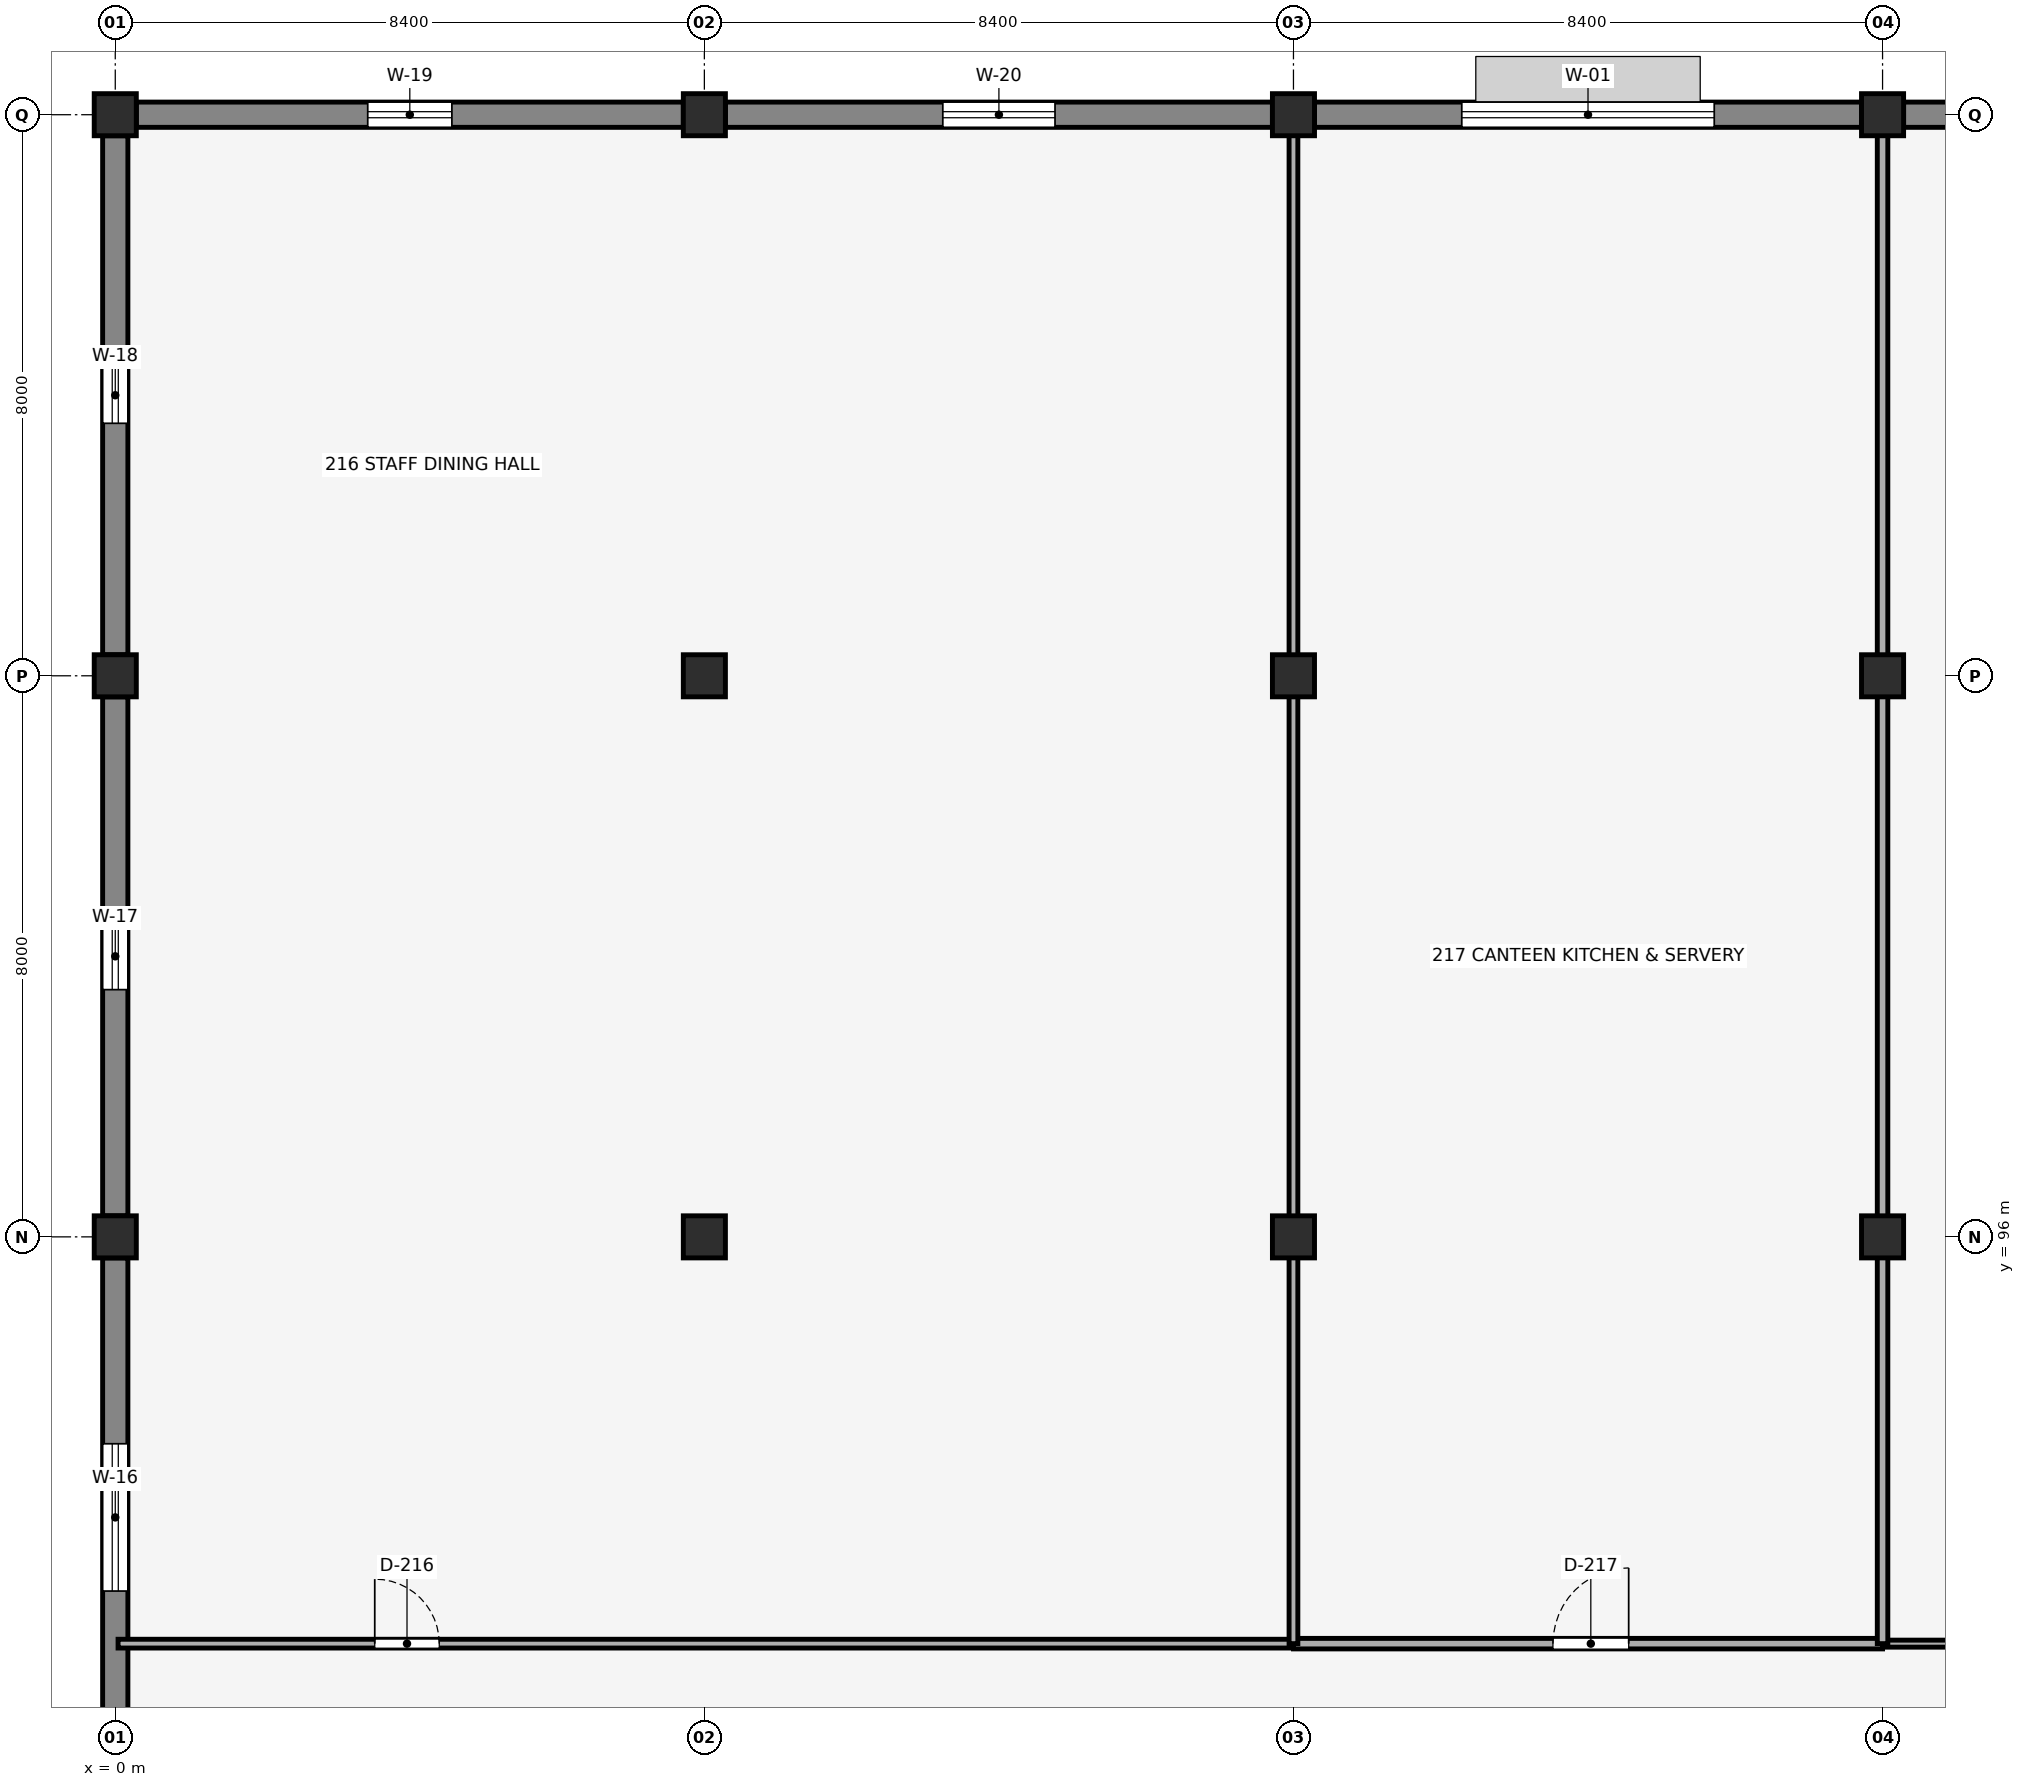
"""IFC4 building model, lengths in metres.
Left out: names, types, materials, properties, quantities, classifications, styles, units other than length and angle.
Written with IfcOpenShell. Run it as: python <this file> out.ifc"""

import sys

from ifc_helpers import new_model, si_unit, direction, frame, frame_2d, origin, origin_2d, place, context, subcontext, project, spatial, rectangle, extrude, element, fill, save


model = new_model("IFC4")
c1 = context("Model", 3, precision=1e-05, world=origin(), true_north=direction((0.0, 1.0)))
c2 = subcontext(c1, "Body", "Model", "MODEL_VIEW")
j1 = project(units=[si_unit("LENGTHUNIT", "METRE"), si_unit("PLANEANGLEUNIT", "RADIAN")], contexts=[c1])
p1 = place(None, origin())
s1 = spatial("IfcSite", under=j1, at=p1, CompositionType="ELEMENT")
p2 = place(p1, origin())
s2 = spatial("IfcBuilding", under=s1, at=p2, CompositionType="ELEMENT")
p3 = place(p2, frame((0.0, 0.0, 9.52)))
s3 = spatial("IfcBuildingStorey", under=s2, at=p3, CompositionType="ELEMENT", Elevation=9.52)
for number, where, z_axis, x_axis in (
    (1, (0.0, 96.0, 0.0), (0.0, 0.0, 1.0), (1.0, 0.0, 0.0)),
    (2, (0.0, 104.0, 0.0), (0.0, 0.0, 1.0), (1.0, 0.0, 0.0)),
    (3, (0.0, 112.0, 0.0), (0.0, 0.0, 1.0), (1.0, 0.0, 0.0)),
    (4, (8.4, 96.0, 0.0), (0.0, 0.0, 1.0), (1.0, 0.0, 0.0)),
    (5, (8.4, 104.0, 0.0), (0.0, 0.0, 1.0), (1.0, 0.0, 0.0)),
    (6, (8.4, 112.0, 0.0), (0.0, 0.0, 1.0), (1.0, 0.0, 0.0)),
    (7, (16.8, 96.0, 0.0), (0.0, 0.0, 1.0), (1.0, 0.0, 0.0)),
    (8, (16.8, 104.0, 0.0), (0.0, 0.0, 1.0), (1.0, 0.0, 0.0)),
    (9, (16.8, 112.0, 0.0), (0.0, 0.0, 1.0), (1.0, 0.0, 0.0)),
    (10, (25.2, 96.0, 0.0), (0.0, 0.0, 1.0), (1.0, 0.0, 0.0)),
    (11, (25.2, 104.0, 0.0), (0.0, 0.0, 1.0), (1.0, 0.0, 0.0)),
    (12, (25.2, 112.0, 0.0), (0.0, 0.0, 1.0), (1.0, 0.0, 0.0)),
):
    element("IfcColumn", number, at=place(p3, frame(where, z_axis=z_axis, x_axis=x_axis)), inside=s3, PredefinedType="COLUMN", context=c2, shape_type="SweptSolid", body=[
        extrude(rectangle(XDim=0.6, YDim=0.6, at=origin_2d()), origin(), (0.0, 0.0, 1.0), 3.57),
    ])
p4 = place(p3, frame((0.0, 88.3, 0.0), z_axis=(0.0, 0.0, 1.0), x_axis=(0.0, 1.0, 0.0)))
e13 = element("IfcWall", 13, at=p4, inside=s3, PredefinedType="SOLIDWALL", context=c2, shape_type="SweptSolid", body=[
    extrude(rectangle(XDim=7.4, YDim=0.36, at=frame_2d((3.7, 0.0))), origin(), (0.0, 0.0, 1.0), 3.219),
])
p5 = place(p4, frame((2.65, 0.0, 1.55), z_axis=(0.0, 0.0, 1.0), x_axis=(1.0, 0.0, 0.0)))
e14 = element("IfcOpeningElement", 14, at=p5, cuts=e13, PredefinedType="OPENING", context=c2, shape_type="SweptSolid", body=[
    extrude(rectangle(XDim=2.1, YDim=0.8, at=frame_2d((1.05, 0.4))), frame((0.0, 0.19, 0.0), z_axis=(0.0, -1.0, 0.0), x_axis=(1.0, 0.0, 0.0)), (0.0, 0.0, 1.0), 0.38),
])
p6 = place(p3, frame((0.0, 96.3, 0.0), z_axis=(0.0, 0.0, 1.0), x_axis=(0.0, 1.0, 0.0)))
e15 = element("IfcWall", 15, at=p6, inside=s3, PredefinedType="SOLIDWALL", context=c2, shape_type="SweptSolid", body=[
    extrude(rectangle(XDim=7.4, YDim=0.36, at=frame_2d((3.7, 0.0))), origin(), (0.0, 0.0, 1.0), 3.219),
])
p7 = place(p6, frame((3.225, 0.0, 0.65), z_axis=(0.0, 0.0, 1.0), x_axis=(1.0, 0.0, 0.0)))
e16 = element("IfcOpeningElement", 16, at=p7, cuts=e15, PredefinedType="OPENING", context=c2, shape_type="SweptSolid", body=[
    extrude(rectangle(XDim=0.95, YDim=2.1, at=frame_2d((0.475, 1.05))), frame((0.0, 0.19, 0.0), z_axis=(0.0, -1.0, 0.0), x_axis=(1.0, 0.0, 0.0)), (0.0, 0.0, 1.0), 0.38),
])
p8 = place(p3, frame((0.0, 104.3, 0.0), z_axis=(0.0, 0.0, 1.0), x_axis=(0.0, 1.0, 0.0)))
e17 = element("IfcWall", 17, at=p8, inside=s3, PredefinedType="SOLIDWALL", context=c2, shape_type="SweptSolid", body=[
    extrude(rectangle(XDim=7.4, YDim=0.36, at=frame_2d((3.7, 0.0))), origin(), (0.0, 0.0, 1.0), 3.219),
])
p9 = place(p8, frame((3.3, 0.0, 0.65), z_axis=(0.0, 0.0, 1.0), x_axis=(1.0, 0.0, 0.0)))
e18 = element("IfcOpeningElement", 18, at=p9, cuts=e17, PredefinedType="OPENING", context=c2, shape_type="SweptSolid", body=[
    extrude(rectangle(XDim=0.8, YDim=1.85, at=frame_2d((0.4, 0.925))), frame((0.0, 0.19, 0.0), z_axis=(0.0, -1.0, 0.0), x_axis=(1.0, 0.0, 0.0)), (0.0, 0.0, 1.0), 0.38),
])
p10 = place(p3, frame((0.3, 112.0, 0.0), z_axis=(0.0, 0.0, 1.0), x_axis=(1.0, 0.0, 0.0)))
e19 = element("IfcWall", 19, at=p10, inside=s3, PredefinedType="SOLIDWALL", context=c2, shape_type="SweptSolid", body=[
    extrude(rectangle(XDim=7.8, YDim=0.36, at=frame_2d((3.9, 0.0))), origin(), (0.0, 0.0, 1.0), 3.27),
])
p11 = place(p10, frame((3.3, 0.0, 1.55), z_axis=(0.0, 0.0, 1.0), x_axis=(1.0, 0.0, 0.0)))
e20 = element("IfcOpeningElement", 20, at=p11, cuts=e19, PredefinedType="OPENING", context=c2, shape_type="SweptSolid", body=[
    extrude(rectangle(XDim=1.2, YDim=0.95, at=frame_2d((0.6, 0.475))), frame((0.0, 0.19, 0.0), z_axis=(0.0, -1.0, 0.0), x_axis=(1.0, 0.0, 0.0)), (0.0, 0.0, 1.0), 0.38),
])
p12 = place(p3, frame((8.7, 112.0, 0.0), z_axis=(0.0, 0.0, 1.0), x_axis=(1.0, 0.0, 0.0)))
e21 = element("IfcWall", 21, at=p12, inside=s3, PredefinedType="SOLIDWALL", context=c2, shape_type="SweptSolid", body=[
    extrude(rectangle(XDim=7.8, YDim=0.36, at=frame_2d((3.9, 0.0))), origin(), (0.0, 0.0, 1.0), 3.27),
])
p13 = place(p12, frame((3.1, 0.0, 0.9), z_axis=(0.0, 0.0, 1.0), x_axis=(1.0, 0.0, 0.0)))
e22 = element("IfcOpeningElement", 22, at=p13, cuts=e21, PredefinedType="OPENING", context=c2, shape_type="SweptSolid", body=[
    extrude(rectangle(XDim=1.6, YDim=1.2, at=frame_2d((0.8, 0.6))), frame((0.0, 0.19, 0.0), z_axis=(0.0, -1.0, 0.0), x_axis=(1.0, 0.0, 0.0)), (0.0, 0.0, 1.0), 0.38),
])
p14 = place(p3, frame((17.1, 112.0, 0.0), z_axis=(0.0, 0.0, 1.0), x_axis=(1.0, 0.0, 0.0)))
e23 = element("IfcWall", 23, at=p14, inside=s3, PredefinedType="SOLIDWALL", context=c2, shape_type="SweptSolid", body=[
    extrude(rectangle(XDim=7.8, YDim=0.36, at=frame_2d((3.9, 0.0))), origin(), (0.0, 0.0, 1.0), 3.27),
])
p15 = place(p14, frame((2.1, 0.0, 0.9), z_axis=(0.0, 0.0, 1.0), x_axis=(1.0, 0.0, 0.0)))
e24 = element("IfcOpeningElement", 24, at=p15, cuts=e23, PredefinedType="OPENING", context=c2, shape_type="SweptSolid", body=[
    extrude(rectangle(XDim=3.6, YDim=1.8, at=frame_2d((1.8, 0.9))), frame((0.0, 0.19, 0.0), z_axis=(0.0, -1.0, 0.0), x_axis=(1.0, 0.0, 0.0)), (0.0, 0.0, 1.0), 0.38),
])
p16 = place(p3, frame((25.5, 112.0, 0.0), z_axis=(0.0, 0.0, 1.0), x_axis=(1.0, 0.0, 0.0)))
e25 = element("IfcWall", 25, at=p16, inside=s3, PredefinedType="SOLIDWALL", context=c2, shape_type="SweptSolid", body=[
    extrude(rectangle(XDim=7.8, YDim=0.36, at=frame_2d((3.9, 0.0))), origin(), (0.0, 0.0, 1.0), 3.27),
])
p17 = place(p16, frame((2.2, 0.0, 0.9), z_axis=(0.0, 0.0, 1.0), x_axis=(1.0, 0.0, 0.0)))
e26 = element("IfcOpeningElement", 26, at=p17, cuts=e25, PredefinedType="OPENING", context=c2, shape_type="SweptSolid", body=[
    extrude(rectangle(XDim=3.4, YDim=1.7, at=frame_2d((1.7, 0.85))), frame((0.0, 0.19, 0.0), z_axis=(0.0, -1.0, 0.0), x_axis=(1.0, 0.0, 0.0)), (0.0, 0.0, 1.0), 0.38),
])
p18 = place(p3, frame((0.04, 90.2, 0.0), z_axis=(0.0, 0.0, 1.0), x_axis=(1.0, 0.0, 0.0)))
e27 = element("IfcWall", 27, at=p18, inside=s3, PredefinedType="PARTITIONING", context=c2, shape_type="SweptSolid", body=[
    extrude(rectangle(XDim=16.76, YDim=0.125, at=frame_2d((8.38, 0.0))), origin(), (0.0, 0.0, 1.0), 3.107),
])
p19 = place(p18, frame((3.66, 0.0, 0.0), z_axis=(0.0, 0.0, 1.0), x_axis=(1.0, 0.0, 0.0)))
e28 = element("IfcOpeningElement", 28, at=p19, cuts=e27, PredefinedType="OPENING", context=c2, shape_type="SweptSolid", body=[
    extrude(rectangle(XDim=0.92, YDim=2.12, at=frame_2d((0.46, 1.06))), frame((0.0, 0.073, 0.0), z_axis=(0.0, -1.0, 0.0), x_axis=(1.0, 0.0, 0.0)), (0.0, 0.0, 1.0), 0.145),
])
p20 = place(p3, frame((16.8, 90.2, 0.0), z_axis=(0.0, 0.0, 1.0), x_axis=(1.0, 0.0, 0.0)))
e29 = element("IfcWall", 29, at=p20, inside=s3, PredefinedType="PARTITIONING", context=c2, shape_type="SweptSolid", body=[
    extrude(rectangle(XDim=8.4, YDim=0.15, at=frame_2d((4.2, 0.0))), origin(), (0.0, 0.0, 1.0), 3.57),
])
p21 = place(p20, frame((3.7, 0.0, 0.0), z_axis=(0.0, 0.0, 1.0), x_axis=(1.0, 0.0, 0.0)))
e30 = element("IfcOpeningElement", 30, at=p21, cuts=e29, PredefinedType="OPENING", context=c2, shape_type="SweptSolid", body=[
    extrude(rectangle(XDim=1.08, YDim=2.18, at=frame_2d((0.54, 1.09))), frame((0.0, 0.085, 0.0), z_axis=(0.0, -1.0, 0.0), x_axis=(1.0, 0.0, 0.0)), (0.0, 0.0, 1.0), 0.17),
])
p22 = place(p3, frame((25.2, 90.2, 0.0), z_axis=(0.0, 0.0, 1.0), x_axis=(1.0, 0.0, 0.0)))
e31 = element("IfcWall", 31, at=p22, inside=s3, PredefinedType="PARTITIONING", context=c2, shape_type="SweptSolid", body=[
    extrude(rectangle(XDim=16.8, YDim=0.1, at=frame_2d((8.4, 0.0))), origin(), (0.0, 0.0, 1.0), 3.57),
])
p23 = place(p22, frame((3.7, 0.0, 0.0), z_axis=(0.0, 0.0, 1.0), x_axis=(1.0, 0.0, 0.0)))
e32 = element("IfcOpeningElement", 32, at=p23, cuts=e31, PredefinedType="OPENING", context=c2, shape_type="SweptSolid", body=[
    extrude(rectangle(XDim=1.02, YDim=2.16, at=frame_2d((0.51, 1.08))), frame((0.0, 0.06, 0.0), z_axis=(0.0, -1.0, 0.0), x_axis=(1.0, 0.0, 0.0)), (0.0, 0.0, 1.0), 0.12),
])
p24 = place(p3, frame((16.8, 90.2, 0.0), z_axis=(0.0, 0.0, 1.0), x_axis=(0.0, 1.0, 0.0)))
e33 = element("IfcWall", 33, at=p24, inside=s3, PredefinedType="PARTITIONING", context=c2, shape_type="SweptSolid", body=[
    extrude(rectangle(XDim=5.51, YDim=0.125, at=frame_2d((2.755, 0.0))), origin(), (0.0, 0.0, 1.0), 3.107),
])
for number, where, z_axis, x_axis in (
    (34, (16.8, 96.29, 0.0), (0.0, 0.0, 1.0), (0.0, 1.0, 0.0)),
    (35, (16.8, 104.29, 0.0), (0.0, 0.0, 1.0), (0.0, 1.0, 0.0)),
):
    element("IfcWall", number, at=place(p3, frame(where, z_axis=z_axis, x_axis=x_axis)), inside=s3, PredefinedType="PARTITIONING", context=c2, shape_type="SweptSolid", body=[
        extrude(rectangle(XDim=7.42, YDim=0.125, at=frame_2d((3.71, 0.0))), origin(), (0.0, 0.0, 1.0), 3.107),
    ])
p25 = place(p3, frame((25.2, 90.2, 0.0), z_axis=(0.0, 0.0, 1.0), x_axis=(0.0, 1.0, 0.0)))
e36 = element("IfcWall", 36, at=p25, inside=s3, PredefinedType="PARTITIONING", context=c2, shape_type="SweptSolid", body=[
    extrude(rectangle(XDim=5.51, YDim=0.15, at=frame_2d((2.755, 0.0))), origin(), (0.0, 0.0, 1.0), 3.107),
])
for number, where, z_axis, x_axis in (
    (37, (25.2, 96.29, 0.0), (0.0, 0.0, 1.0), (0.0, 1.0, 0.0)),
    (38, (25.2, 104.29, 0.0), (0.0, 0.0, 1.0), (0.0, 1.0, 0.0)),
):
    element("IfcWall", number, at=place(p3, frame(where, z_axis=z_axis, x_axis=x_axis)), inside=s3, PredefinedType="PARTITIONING", context=c2, shape_type="SweptSolid", body=[
        extrude(rectangle(XDim=7.42, YDim=0.15, at=frame_2d((3.71, 0.0))), origin(), (0.0, 0.0, 1.0), 3.107),
    ])
p26 = place(p5, origin())
e39 = element("IfcWindow", 39, at=p26, inside=s3, PartitioningType="DOUBLE_PANEL_HORIZONTAL", PredefinedType="WINDOW", context=c2, shape_type="SweptSolid", body=[
    extrude(rectangle(XDim=2.1, YDim=0.8, at=frame_2d((1.05, 0.4))), frame((0.0, 0.03, 0.0), z_axis=(0.0, -1.0, 0.0), x_axis=(1.0, 0.0, 0.0)), (0.0, 0.0, 1.0), 0.06),
])
fill(e14, e39)
p27 = place(p7, origin())
e40 = element("IfcWindow", 40, at=p27, inside=s3, PartitioningType="SINGLE_PANEL", PredefinedType="WINDOW", context=c2, shape_type="SweptSolid", body=[
    extrude(rectangle(XDim=0.95, YDim=2.1, at=frame_2d((0.475, 1.05))), frame((0.0, 0.03, 0.0), z_axis=(0.0, -1.0, 0.0), x_axis=(1.0, 0.0, 0.0)), (0.0, 0.0, 1.0), 0.06),
])
fill(e16, e40)
p28 = place(p9, origin())
e41 = element("IfcWindow", 41, at=p28, inside=s3, PartitioningType="SINGLE_PANEL", PredefinedType="WINDOW", context=c2, shape_type="SweptSolid", body=[
    extrude(rectangle(XDim=0.8, YDim=1.85, at=frame_2d((0.4, 0.925))), frame((0.0, 0.03, 0.0), z_axis=(0.0, -1.0, 0.0), x_axis=(1.0, 0.0, 0.0)), (0.0, 0.0, 1.0), 0.06),
])
fill(e18, e41)
p29 = place(p11, origin())
e42 = element("IfcWindow", 42, at=p29, inside=s3, PartitioningType="SINGLE_PANEL", PredefinedType="WINDOW", context=c2, shape_type="SweptSolid", body=[
    extrude(rectangle(XDim=1.2, YDim=0.95, at=frame_2d((0.6, 0.475))), frame((0.0, 0.03, 0.0), z_axis=(0.0, -1.0, 0.0), x_axis=(1.0, 0.0, 0.0)), (0.0, 0.0, 1.0), 0.06),
])
fill(e20, e42)
p30 = place(p13, origin())
e43 = element("IfcWindow", 43, at=p30, inside=s3, PartitioningType="DOUBLE_PANEL_VERTICAL", PredefinedType="WINDOW", context=c2, shape_type="SweptSolid", body=[
    extrude(rectangle(XDim=1.6, YDim=1.2, at=frame_2d((0.8, 0.6))), frame((0.0, 0.03, 0.0), z_axis=(0.0, -1.0, 0.0), x_axis=(1.0, 0.0, 0.0)), (0.0, 0.0, 1.0), 0.06),
])
fill(e22, e43)
p31 = place(p15, origin())
e44 = element("IfcWindow", 44, at=p31, inside=s3, PartitioningType="TRIPLE_PANEL_VERTICAL", PredefinedType="WINDOW", context=c2, shape_type="SweptSolid", body=[
    extrude(rectangle(XDim=3.6, YDim=1.8, at=frame_2d((1.8, 0.9))), frame((0.0, 0.03, 0.0), z_axis=(0.0, -1.0, 0.0), x_axis=(1.0, 0.0, 0.0)), (0.0, 0.0, 1.0), 0.06),
])
fill(e24, e44)
p32 = place(p19, origin())
e45 = element("IfcDoor", 45, at=p32, inside=s3, OperationType="SINGLE_SWING_LEFT", PredefinedType="DOOR", context=c2, shape_type="SweptSolid", body=[
    extrude(rectangle(XDim=0.92, YDim=2.12, at=frame_2d((0.46, 1.06))), frame((0.0, 0.025, 0.0), z_axis=(0.0, -1.0, 0.0), x_axis=(1.0, 0.0, 0.0)), (0.0, 0.0, 1.0), 0.05),
])
fill(e28, e45)
p33 = place(p21, origin())
e46 = element("IfcDoor", 46, at=p33, inside=s3, OperationType="SINGLE_SWING_RIGHT", PredefinedType="DOOR", context=c2, shape_type="SweptSolid", body=[
    extrude(rectangle(XDim=1.08, YDim=2.18, at=frame_2d((0.54, 1.09))), frame((0.0, 0.025, 0.0), z_axis=(0.0, -1.0, 0.0), x_axis=(1.0, 0.0, 0.0)), (0.0, 0.0, 1.0), 0.05),
])
fill(e30, e46)
save(model, sys.argv[1])
